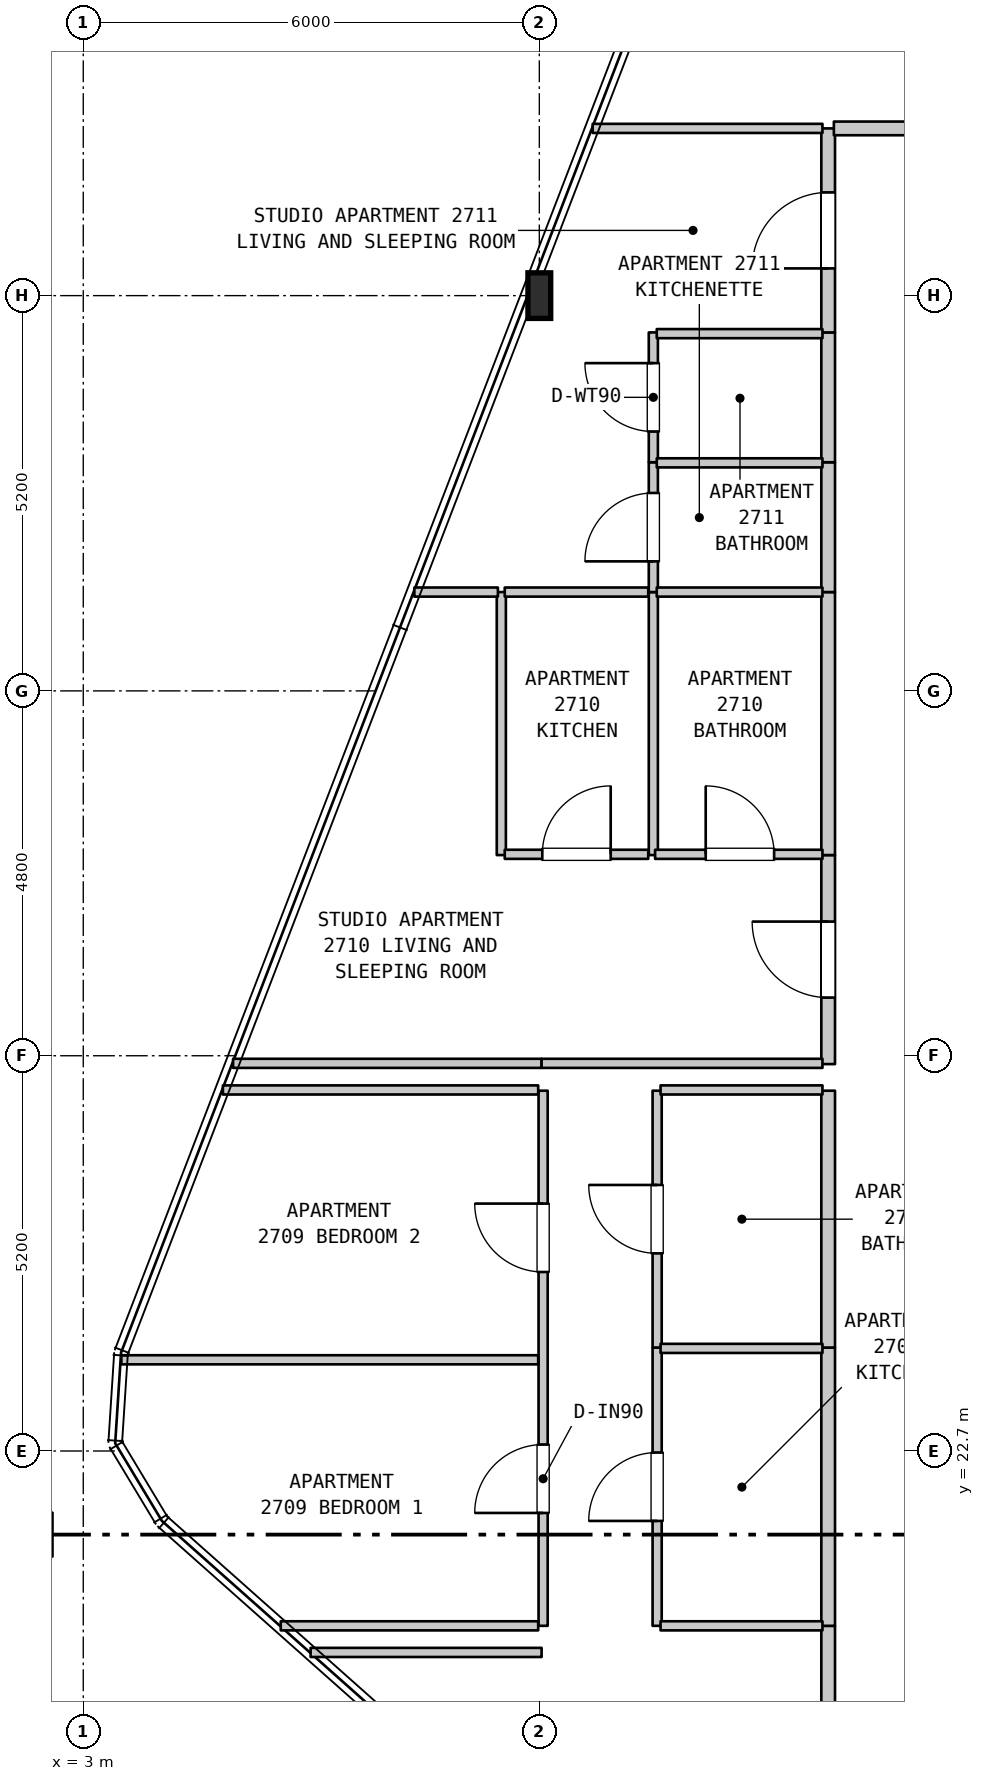
"""IFC4 building model, lengths in metres.
Left out: names, types, materials, properties, quantities, classifications, styles, units other than length and angle.
Written with IfcOpenShell. Run it as: python <this file> out.ifc"""

import sys

from ifc_helpers import new_model, si_unit, direction, frame, frame_2d, origin, origin_2d, place, context, subcontext, project, spatial, rectangle, i_section, extrude, element, fill, save


model = new_model("IFC4")
c1 = context("Model", 3, precision=1e-05, world=origin(), true_north=direction((0.0, 1.0)))
c2 = subcontext(c1, "Body", "Model", "MODEL_VIEW")
j1 = project(units=[si_unit("LENGTHUNIT", "METRE"), si_unit("PLANEANGLEUNIT", "RADIAN")], contexts=[c1])
p1 = place(None, origin())
s1 = spatial("IfcSite", under=j1, at=p1, CompositionType="ELEMENT")
p2 = place(p1, origin())
s2 = spatial("IfcBuilding", under=s1, at=p2, CompositionType="ELEMENT")
p3 = place(p2, frame((0.0, 0.0, 113.1)))
s3 = spatial("IfcBuildingStorey", under=s2, at=p3, CompositionType="ELEMENT", Elevation=113.1)
p4 = place(p3, frame((9.0, 37.9, 0.0), z_axis=(0.0, 0.0, 1.0), x_axis=(1.0, 0.0, 0.0)))
e1 = element("IfcColumn", 1, at=p4, inside=s3, PredefinedType="COLUMN", context=c2, shape_type="SweptSolid", body=[
    extrude(i_section(OverallWidth=0.3, OverallDepth=0.6, WebThickness=0.015, FlangeThickness=0.03, FilletRadius=0.027, at=origin_2d()), origin(), (0.0, 0.0, 1.0), 3.7),
])
p5 = place(p3, frame((8.5, 30.54, 0.0), z_axis=(0.0, 0.0, 1.0), x_axis=(0.0, 1.0, 0.0)))
e2 = element("IfcWall", 2, at=p5, inside=s3, PredefinedType="PARTITIONING", context=c2, shape_type="SweptSolid", body=[
    extrude(rectangle(XDim=3.46, YDim=0.12, at=frame_2d((1.73, 0.0))), origin(), (0.0, 0.0, 1.0), 3.385),
])
p6 = place(p3, frame((9.05, 20.4, 0.0), z_axis=(0.0, 0.0, 1.0), x_axis=(0.0, 1.0, 0.0)))
e3 = element("IfcWall", 3, at=p6, inside=s3, PredefinedType="PARTITIONING", context=c2, shape_type="SweptSolid", body=[
    extrude(rectangle(XDim=7.04, YDim=0.12, at=frame_2d((3.52, 0.0))), origin(), (0.0, 0.0, 1.0), 2.785),
])
p7 = place(p6, frame((1.485, 0.0, 0.0)))
e4 = element("IfcOpeningElement", 4, at=p7, cuts=e3, PredefinedType="OPENING", context=c2, shape_type="SweptSolid", body=[
    extrude(rectangle(XDim=0.9, YDim=2.15, at=frame_2d((0.45, 1.075))), frame((0.0, 0.07, 0.0), z_axis=(0.0, -1.0, 0.0), x_axis=(1.0, 0.0, 0.0)), (0.0, 0.0, 1.0), 0.14),
])
p8 = place(p6, frame((4.655, 0.0, 0.0)))
e5 = element("IfcOpeningElement", 5, at=p8, cuts=e3, PredefinedType="OPENING", context=c2, shape_type="SweptSolid", body=[
    extrude(rectangle(XDim=0.9, YDim=2.15, at=frame_2d((0.45, 1.075))), frame((0.0, 0.07, 0.0), z_axis=(0.0, -1.0, 0.0), x_axis=(1.0, 0.0, 0.0)), (0.0, 0.0, 1.0), 0.14),
])
p9 = place(p3, frame((10.5, 30.54, 0.0), z_axis=(0.0, 0.0, 1.0), x_axis=(0.0, 1.0, 0.0)))
e6 = element("IfcWall", 6, at=p9, inside=s3, PredefinedType="PARTITIONING", context=c2, shape_type="SweptSolid", body=[
    extrude(rectangle(XDim=3.46, YDim=0.12, at=frame_2d((1.73, 0.0))), origin(), (0.0, 0.0, 1.0), 3.385),
])
p10 = place(p3, frame((10.5, 34.0, 0.0), z_axis=(0.0, 0.0, 1.0), x_axis=(0.0, 1.0, 0.0)))
e7 = element("IfcWall", 7, at=p10, inside=s3, PredefinedType="PARTITIONING", context=c2, shape_type="SweptSolid", body=[
    extrude(rectangle(XDim=1.708, YDim=0.12, at=frame_2d((0.854, 0.0))), origin(), (0.0, 0.0, 1.0), 3.385),
])
p11 = place(p10, frame((0.404, 0.0, 0.0)))
e8 = element("IfcOpeningElement", 8, at=p11, cuts=e7, PredefinedType="OPENING", context=c2, shape_type="SweptSolid", body=[
    extrude(rectangle(XDim=0.9, YDim=2.15, at=frame_2d((0.45, 1.075))), frame((0.0, 0.07, 0.0), z_axis=(0.0, -1.0, 0.0), x_axis=(1.0, 0.0, 0.0)), (0.0, 0.0, 1.0), 0.14),
])
p12 = place(p3, frame((10.5, 35.708, 0.0), z_axis=(0.0, 0.0, 1.0), x_axis=(0.0, 1.0, 0.0)))
e9 = element("IfcWall", 9, at=p12, inside=s3, PredefinedType="PARTITIONING", context=c2, shape_type="SweptSolid", body=[
    extrude(rectangle(XDim=1.708, YDim=0.12, at=frame_2d((0.854, 0.0))), origin(), (0.0, 0.0, 1.0), 3.385),
])
p13 = place(p12, frame((0.404, 0.0, 0.0)))
e10 = element("IfcOpeningElement", 10, at=p13, cuts=e9, PredefinedType="OPENING", context=c2, shape_type="SweptSolid", body=[
    extrude(rectangle(XDim=0.9, YDim=2.1, at=frame_2d((0.45, 1.05))), frame((0.0, 0.07, 0.0), z_axis=(0.0, -1.0, 0.0), x_axis=(1.0, 0.0, 0.0)), (0.0, 0.0, 1.0), 0.14),
])
p14 = place(p3, frame((10.55, 20.4, 0.0), z_axis=(0.0, 0.0, 1.0), x_axis=(0.0, 1.0, 0.0)))
e11 = element("IfcWall", 11, at=p14, inside=s3, PredefinedType="PARTITIONING", context=c2, shape_type="SweptSolid", body=[
    extrude(rectangle(XDim=3.661, YDim=0.12, at=frame_2d((1.831, 0.0))), origin(), (0.0, 0.0, 1.0), 3.385),
])
p15 = place(p14, frame((1.38, 0.0, 0.0)))
e12 = element("IfcOpeningElement", 12, at=p15, cuts=e11, PredefinedType="OPENING", context=c2, shape_type="SweptSolid", body=[
    extrude(rectangle(XDim=0.9, YDim=2.15, at=frame_2d((0.45, 1.075))), frame((0.0, 0.07, 0.0), z_axis=(0.0, -1.0, 0.0), x_axis=(1.0, 0.0, 0.0)), (0.0, 0.0, 1.0), 0.14),
])
p16 = place(p3, frame((10.55, 24.061, 0.0), z_axis=(0.0, 0.0, 1.0), x_axis=(0.0, 1.0, 0.0)))
e13 = element("IfcWall", 13, at=p16, inside=s3, PredefinedType="PARTITIONING", context=c2, shape_type="SweptSolid", body=[
    extrude(rectangle(XDim=3.379, YDim=0.12, at=frame_2d((1.689, 0.0))), origin(), (0.0, 0.0, 1.0), 3.385),
])
p17 = place(p16, frame((1.239, 0.0, 0.0)))
e14 = element("IfcOpeningElement", 14, at=p17, cuts=e13, PredefinedType="OPENING", context=c2, shape_type="SweptSolid", body=[
    extrude(rectangle(XDim=0.9, YDim=2.1, at=frame_2d((0.45, 1.05))), frame((0.0, 0.07, 0.0), z_axis=(0.0, -1.0, 0.0), x_axis=(1.0, 0.0, 0.0)), (0.0, 0.0, 1.0), 0.14),
])
p18 = place(p3, frame((12.8, 17.3, 0.0), z_axis=(0.0, 0.0, 1.0), x_axis=(0.0, 1.0, 0.0)))
e15 = element("IfcWall", 15, at=p18, inside=s3, PredefinedType="STANDARD", context=c2, shape_type="SweptSolid", body=[
    extrude(rectangle(XDim=3.1, YDim=0.18, at=frame_2d((1.55, 0.0))), origin(), (0.0, 0.0, 1.0), 3.385),
])
p19 = place(p18, frame((0.978, 0.0, 0.0)))
e16 = element("IfcOpeningElement", 16, at=p19, cuts=e15, PredefinedType="OPENING", context=c2, shape_type="SweptSolid", body=[
    extrude(rectangle(XDim=1.0, YDim=2.15, at=frame_2d((0.5, 1.075))), frame((0.0, 0.1, 0.0), z_axis=(0.0, -1.0, 0.0), x_axis=(1.0, 0.0, 0.0)), (0.0, 0.0, 1.0), 0.2),
])
p20 = place(p3, frame((12.8, 20.4, 0.0), z_axis=(0.0, 0.0, 1.0), x_axis=(0.0, 1.0, 0.0)))
e17 = element("IfcWall", 17, at=p20, inside=s3, PredefinedType="STANDARD", context=c2, shape_type="SweptSolid", body=[
    extrude(rectangle(XDim=3.661, YDim=0.18, at=frame_2d((1.831, 0.0))), origin(), (0.0, 0.0, 1.0), 3.385),
])
p21 = place(p3, frame((12.8, 24.061, 0.0), z_axis=(0.0, 0.0, 1.0), x_axis=(0.0, 1.0, 0.0)))
e18 = element("IfcWall", 18, at=p21, inside=s3, PredefinedType="STANDARD", context=c2, shape_type="SweptSolid", body=[
    extrude(rectangle(XDim=3.379, YDim=0.18, at=frame_2d((1.689, 0.0))), origin(), (0.0, 0.0, 1.0), 3.385),
])
p22 = place(p3, frame((12.8, 27.79, 0.0), z_axis=(0.0, 0.0, 1.0), x_axis=(0.0, 1.0, 0.0)))
e19 = element("IfcWall", 19, at=p22, inside=s3, PredefinedType="STANDARD", context=c2, shape_type="SweptSolid", body=[
    extrude(rectangle(XDim=2.75, YDim=0.18, at=frame_2d((1.375, 0.0))), origin(), (0.0, 0.0, 1.0), 3.385),
])
p23 = place(p22, frame((0.875, 0.0, 0.0)))
e20 = element("IfcOpeningElement", 20, at=p23, cuts=e19, PredefinedType="OPENING", context=c2, shape_type="SweptSolid", body=[
    extrude(rectangle(XDim=1.0, YDim=2.15, at=frame_2d((0.5, 1.075))), frame((0.0, 0.1, 0.0), z_axis=(0.0, -1.0, 0.0), x_axis=(1.0, 0.0, 0.0)), (0.0, 0.0, 1.0), 0.2),
])
p24 = place(p3, frame((12.8, 30.54, 0.0), z_axis=(0.0, 0.0, 1.0), x_axis=(0.0, 1.0, 0.0)))
e21 = element("IfcWall", 21, at=p24, inside=s3, PredefinedType="STANDARD", context=c2, shape_type="SweptSolid", body=[
    extrude(rectangle(XDim=3.46, YDim=0.18, at=frame_2d((1.73, 0.0))), origin(), (0.0, 0.0, 1.0), 3.385),
])
for number, where, z_axis, x_axis in (
    (22, (12.8, 34.0, 0.0), (0.0, 0.0, 1.0), (0.0, 1.0, 0.0)),
    (23, (12.8, 35.708, 0.0), (0.0, 0.0, 1.0), (0.0, 1.0, 0.0)),
):
    element("IfcWall", number, at=place(p3, frame(where, z_axis=z_axis, x_axis=x_axis)), inside=s3, PredefinedType="STANDARD", context=c2, shape_type="SweptSolid", body=[
        extrude(rectangle(XDim=1.708, YDim=0.18, at=frame_2d((0.854, 0.0))), origin(), (0.0, 0.0, 1.0), 3.385),
    ])
p25 = place(p3, frame((12.8, 37.416, 0.0), z_axis=(0.0, 0.0, 1.0), x_axis=(0.0, 1.0, 0.0)))
e24 = element("IfcWall", 24, at=p25, inside=s3, PredefinedType="STANDARD", context=c2, shape_type="SweptSolid", body=[
    extrude(rectangle(XDim=2.684, YDim=0.18, at=frame_2d((1.342, 0.0))), origin(), (0.0, 0.0, 1.0), 3.385),
])
p26 = place(p25, frame((0.842, 0.0, 0.0)))
e25 = element("IfcOpeningElement", 25, at=p26, cuts=e24, PredefinedType="OPENING", context=c2, shape_type="SweptSolid", body=[
    extrude(rectangle(XDim=1.0, YDim=2.15, at=frame_2d((0.5, 1.075))), frame((0.0, 0.1, 0.0), z_axis=(0.0, -1.0, 0.0), x_axis=(1.0, 0.0, 0.0)), (0.0, 0.0, 1.0), 0.2),
])
p27 = place(p3, frame((5.991, 20.05, 0.0), z_axis=(0.0, 0.0, 1.0), x_axis=(1.0, 0.0, 0.0)))
e26 = element("IfcWall", 26, at=p27, inside=s3, PredefinedType="PARTITIONING", context=c2, shape_type="SweptSolid", body=[
    extrude(rectangle(XDim=3.039, YDim=0.12, at=frame_2d((1.52, 0.0))), origin(), (0.0, 0.0, 1.0), 3.385),
])
p28 = place(p3, frame((5.598, 20.4, 0.0), z_axis=(0.0, 0.0, 1.0), x_axis=(1.0, 0.0, 0.0)))
e27 = element("IfcWall", 27, at=p28, inside=s3, PredefinedType="PARTITIONING", context=c2, shape_type="SweptSolid", body=[
    extrude(rectangle(XDim=3.387, YDim=0.12, at=frame_2d((1.694, 0.0))), origin(), (0.0, 0.0, 1.0), 3.385),
])
p29 = place(p3, frame((10.595, 20.4, 0.0), z_axis=(0.0, 0.0, 1.0), x_axis=(1.0, 0.0, 0.0)))
e28 = element("IfcWall", 28, at=p29, inside=s3, PredefinedType="PARTITIONING", context=c2, shape_type="SweptSolid", body=[
    extrude(rectangle(XDim=2.13, YDim=0.12, at=frame_2d((1.065, 0.0))), origin(), (0.0, 0.0, 1.0), 3.385),
])
p30 = place(p3, frame((3.501, 23.9, 0.0), z_axis=(0.0, 0.0, 1.0), x_axis=(1.0, 0.0, 0.0)))
e29 = element("IfcWall", 29, at=p30, inside=s3, PredefinedType="PARTITIONING", context=c2, shape_type="SweptSolid", body=[
    extrude(rectangle(XDim=5.484, YDim=0.12, at=frame_2d((2.742, 0.0))), origin(), (0.0, 0.0, 1.0), 3.385),
])
p31 = place(p3, frame((10.595, 24.05, 0.0), z_axis=(0.0, 0.0, 1.0), x_axis=(1.0, 0.0, 0.0)))
e30 = element("IfcWall", 30, at=p31, inside=s3, PredefinedType="PARTITIONING", context=c2, shape_type="SweptSolid", body=[
    extrude(rectangle(XDim=2.13, YDim=0.12, at=frame_2d((1.065, 0.0))), origin(), (0.0, 0.0, 1.0), 3.385),
])
p32 = place(p3, frame((4.837, 27.45, 0.0), z_axis=(0.0, 0.0, 1.0), x_axis=(1.0, 0.0, 0.0)))
e31 = element("IfcWall", 31, at=p32, inside=s3, PredefinedType="PARTITIONING", context=c2, shape_type="SweptSolid", body=[
    extrude(rectangle(XDim=4.148, YDim=0.12, at=frame_2d((2.074, 0.0))), origin(), (0.0, 0.0, 1.0), 3.385),
])
p33 = place(p3, frame((10.595, 27.45, 0.0), z_axis=(0.0, 0.0, 1.0), x_axis=(1.0, 0.0, 0.0)))
e32 = element("IfcWall", 32, at=p33, inside=s3, PredefinedType="PARTITIONING", context=c2, shape_type="SweptSolid", body=[
    extrude(rectangle(XDim=2.13, YDim=0.12, at=frame_2d((1.065, 0.0))), origin(), (0.0, 0.0, 1.0), 3.385),
])
p34 = place(p3, frame((4.971, 27.8, 0.0), z_axis=(0.0, 0.0, 1.0), x_axis=(1.0, 0.0, 0.0)))
e33 = element("IfcWall", 33, at=p34, inside=s3, PredefinedType="PARTITIONING", context=c2, shape_type="SweptSolid", body=[
    extrude(rectangle(XDim=4.059, YDim=0.12, at=frame_2d((2.03, 0.0))), origin(), (0.0, 0.0, 1.0), 3.385),
])
p35 = place(p3, frame((9.03, 27.8, 0.0), z_axis=(0.0, 0.0, 1.0), x_axis=(1.0, 0.0, 0.0)))
e34 = element("IfcWall", 34, at=p35, inside=s3, PredefinedType="PARTITIONING", context=c2, shape_type="SweptSolid", body=[
    extrude(rectangle(XDim=3.695, YDim=0.12, at=frame_2d((1.848, 0.0))), origin(), (0.0, 0.0, 1.0), 3.385),
])
p36 = place(p3, frame((8.545, 30.55, 0.0), z_axis=(0.0, 0.0, 1.0), x_axis=(1.0, 0.0, 0.0)))
e35 = element("IfcWall", 35, at=p36, inside=s3, PredefinedType="PARTITIONING", context=c2, shape_type="SweptSolid", body=[
    extrude(rectangle(XDim=1.888, YDim=0.12, at=frame_2d((0.944, 0.0))), origin(), (0.0, 0.0, 1.0), 3.385),
])
p37 = place(p36, frame((0.494, 0.0, 0.0)))
e36 = element("IfcOpeningElement", 36, at=p37, cuts=e35, PredefinedType="OPENING", context=c2, shape_type="SweptSolid", body=[
    extrude(rectangle(XDim=0.9, YDim=2.15, at=frame_2d((0.45, 1.075))), frame((0.0, 0.07, 0.0), z_axis=(0.0, -1.0, 0.0), x_axis=(1.0, 0.0, 0.0)), (0.0, 0.0, 1.0), 0.14),
])
p38 = place(p3, frame((10.523, 30.55, 0.0), z_axis=(0.0, 0.0, 1.0), x_axis=(1.0, 0.0, 0.0)))
e37 = element("IfcWall", 37, at=p38, inside=s3, PredefinedType="PARTITIONING", context=c2, shape_type="SweptSolid", body=[
    extrude(rectangle(XDim=2.202, YDim=0.12, at=frame_2d((1.101, 0.0))), origin(), (0.0, 0.0, 1.0), 3.385),
])
p39 = place(p38, frame((0.666, 0.0, 0.0)))
e38 = element("IfcOpeningElement", 38, at=p39, cuts=e37, PredefinedType="OPENING", context=c2, shape_type="SweptSolid", body=[
    extrude(rectangle(XDim=0.9, YDim=2.1, at=frame_2d((0.45, 1.05))), frame((0.0, 0.07, 0.0), z_axis=(0.0, -1.0, 0.0), x_axis=(1.0, 0.0, 0.0)), (0.0, 0.0, 1.0), 0.14),
])
p40 = place(p3, frame((7.356, 34.0, 0.0), z_axis=(0.0, 0.0, 1.0), x_axis=(1.0, 0.0, 0.0)))
e39 = element("IfcWall", 39, at=p40, inside=s3, PredefinedType="PARTITIONING", context=c2, shape_type="SweptSolid", body=[
    extrude(rectangle(XDim=1.099, YDim=0.12, at=frame_2d((0.55, 0.0))), origin(), (0.0, 0.0, 1.0), 3.385),
])
p41 = place(p3, frame((8.545, 34.0, 0.0), z_axis=(0.0, 0.0, 1.0), x_axis=(1.0, 0.0, 0.0)))
e40 = element("IfcWall", 40, at=p41, inside=s3, PredefinedType="PARTITIONING", context=c2, shape_type="SweptSolid", body=[
    extrude(rectangle(XDim=1.888, YDim=0.12, at=frame_2d((0.944, 0.0))), origin(), (0.0, 0.0, 1.0), 3.385),
])
for number, where, z_axis, x_axis in (
    (41, (10.545, 34.0, 0.0), (0.0, 0.0, 1.0), (1.0, 0.0, 0.0)),
    (42, (10.545, 35.7, 0.0), (0.0, 0.0, 1.0), (1.0, 0.0, 0.0)),
    (43, (10.545, 37.4, 0.0), (0.0, 0.0, 1.0), (1.0, 0.0, 0.0)),
):
    element("IfcWall", number, at=place(p3, frame(where, z_axis=z_axis, x_axis=x_axis)), inside=s3, PredefinedType="PARTITIONING", context=c2, shape_type="SweptSolid", body=[
        extrude(rectangle(XDim=2.18, YDim=0.12, at=frame_2d((1.09, 0.0))), origin(), (0.0, 0.0, 1.0), 3.385),
    ])
p42 = place(p3, frame((9.702, 40.1, 0.0), z_axis=(0.0, 0.0, 1.0), x_axis=(1.0, 0.0, 0.0)))
e44 = element("IfcWall", 44, at=p42, inside=s3, PredefinedType="PARTITIONING", context=c2, shape_type="SweptSolid", body=[
    extrude(rectangle(XDim=3.023, YDim=0.12, at=frame_2d((1.512, 0.0))), origin(), (0.0, 0.0, 1.0), 3.385),
])
p43 = place(p3, frame((12.875, 40.1, 0.0), z_axis=(0.0, 0.0, 1.0), x_axis=(1.0, 0.0, 0.0)))
e45 = element("IfcWall", 45, at=p43, inside=s3, PredefinedType="STANDARD", context=c2, shape_type="SweptSolid", body=[
    extrude(rectangle(XDim=1.48, YDim=0.18, at=frame_2d((0.74, 0.0))), origin(), (0.0, 0.0, 1.0), 3.385),
])
p44 = place(p7, origin())
e46 = element("IfcDoor", 46, at=p44, inside=s3, OperationType="SINGLE_SWING_LEFT", PredefinedType="DOOR", context=c2, shape_type="SweptSolid", body=[
    extrude(rectangle(XDim=0.9, YDim=2.15, at=frame_2d((0.45, 1.075))), frame((0.0, 0.025, 0.0), z_axis=(0.0, -1.0, 0.0), x_axis=(1.0, 0.0, 0.0)), (0.0, 0.0, 1.0), 0.05),
])
fill(e4, e46)
p45 = place(p8, origin())
e47 = element("IfcDoor", 47, at=p45, inside=s3, OperationType="SINGLE_SWING_RIGHT", PredefinedType="DOOR", context=c2, shape_type="SweptSolid", body=[
    extrude(rectangle(XDim=0.9, YDim=2.15, at=frame_2d((0.45, 1.075))), frame((0.0, 0.025, 0.0), z_axis=(0.0, -1.0, 0.0), x_axis=(1.0, 0.0, 0.0)), (0.0, 0.0, 1.0), 0.05),
])
fill(e5, e47)
p46 = place(p11, origin())
e48 = element("IfcDoor", 48, at=p46, inside=s3, OperationType="SINGLE_SWING_LEFT", PredefinedType="DOOR", context=c2, shape_type="SweptSolid", body=[
    extrude(rectangle(XDim=0.9, YDim=2.15, at=frame_2d((0.45, 1.075))), frame((0.0, 0.025, 0.0), z_axis=(0.0, -1.0, 0.0), x_axis=(1.0, 0.0, 0.0)), (0.0, 0.0, 1.0), 0.05),
])
fill(e8, e48)
p47 = place(p13, origin())
e49 = element("IfcDoor", 49, at=p47, inside=s3, OperationType="SINGLE_SWING_RIGHT", PredefinedType="DOOR", context=c2, shape_type="SweptSolid", body=[
    extrude(rectangle(XDim=0.9, YDim=2.1, at=frame_2d((0.45, 1.05))), frame((0.0, 0.025, 0.0), z_axis=(0.0, -1.0, 0.0), x_axis=(1.0, 0.0, 0.0)), (0.0, 0.0, 1.0), 0.05),
])
fill(e10, e49)
p48 = place(p15, origin())
e50 = element("IfcDoor", 50, at=p48, inside=s3, OperationType="SINGLE_SWING_LEFT", PredefinedType="DOOR", context=c2, shape_type="SweptSolid", body=[
    extrude(rectangle(XDim=0.9, YDim=2.15, at=frame_2d((0.45, 1.075))), frame((0.0, 0.025, 0.0), z_axis=(0.0, -1.0, 0.0), x_axis=(1.0, 0.0, 0.0)), (0.0, 0.0, 1.0), 0.05),
])
fill(e12, e50)
p49 = place(p17, origin())
e51 = element("IfcDoor", 51, at=p49, inside=s3, OperationType="SINGLE_SWING_RIGHT", PredefinedType="DOOR", context=c2, shape_type="SweptSolid", body=[
    extrude(rectangle(XDim=0.9, YDim=2.1, at=frame_2d((0.45, 1.05))), frame((0.0, 0.025, 0.0), z_axis=(0.0, -1.0, 0.0), x_axis=(1.0, 0.0, 0.0)), (0.0, 0.0, 1.0), 0.05),
])
fill(e14, e51)
p50 = place(p23, origin())
e52 = element("IfcDoor", 52, at=p50, inside=s3, OperationType="SINGLE_SWING_RIGHT", PredefinedType="DOOR", context=c2, shape_type="SweptSolid", body=[
    extrude(rectangle(XDim=1.0, YDim=2.15, at=frame_2d((0.5, 1.075))), frame((0.0, 0.025, 0.0), z_axis=(0.0, -1.0, 0.0), x_axis=(1.0, 0.0, 0.0)), (0.0, 0.0, 1.0), 0.05),
])
fill(e20, e52)
p51 = place(p26, origin())
e53 = element("IfcDoor", 53, at=p51, inside=s3, OperationType="SINGLE_SWING_LEFT", PredefinedType="DOOR", context=c2, shape_type="SweptSolid", body=[
    extrude(rectangle(XDim=1.0, YDim=2.15, at=frame_2d((0.5, 1.075))), frame((0.0, 0.025, 0.0), z_axis=(0.0, -1.0, 0.0), x_axis=(1.0, 0.0, 0.0)), (0.0, 0.0, 1.0), 0.05),
])
fill(e25, e53)
p52 = place(p37, origin())
e54 = element("IfcDoor", 54, at=p52, inside=s3, OperationType="SINGLE_SWING_RIGHT", PredefinedType="DOOR", context=c2, shape_type="SweptSolid", body=[
    extrude(rectangle(XDim=0.9, YDim=2.15, at=frame_2d((0.45, 1.075))), frame((0.0, 0.025, 0.0), z_axis=(0.0, -1.0, 0.0), x_axis=(1.0, 0.0, 0.0)), (0.0, 0.0, 1.0), 0.05),
])
fill(e36, e54)
p53 = place(p39, origin())
e55 = element("IfcDoor", 55, at=p53, inside=s3, OperationType="SINGLE_SWING_LEFT", PredefinedType="DOOR", context=c2, shape_type="SweptSolid", body=[
    extrude(rectangle(XDim=0.9, YDim=2.1, at=frame_2d((0.45, 1.05))), frame((0.0, 0.025, 0.0), z_axis=(0.0, -1.0, 0.0), x_axis=(1.0, 0.0, 0.0)), (0.0, 0.0, 1.0), 0.05),
])
fill(e38, e55)
save(model, sys.argv[1])
